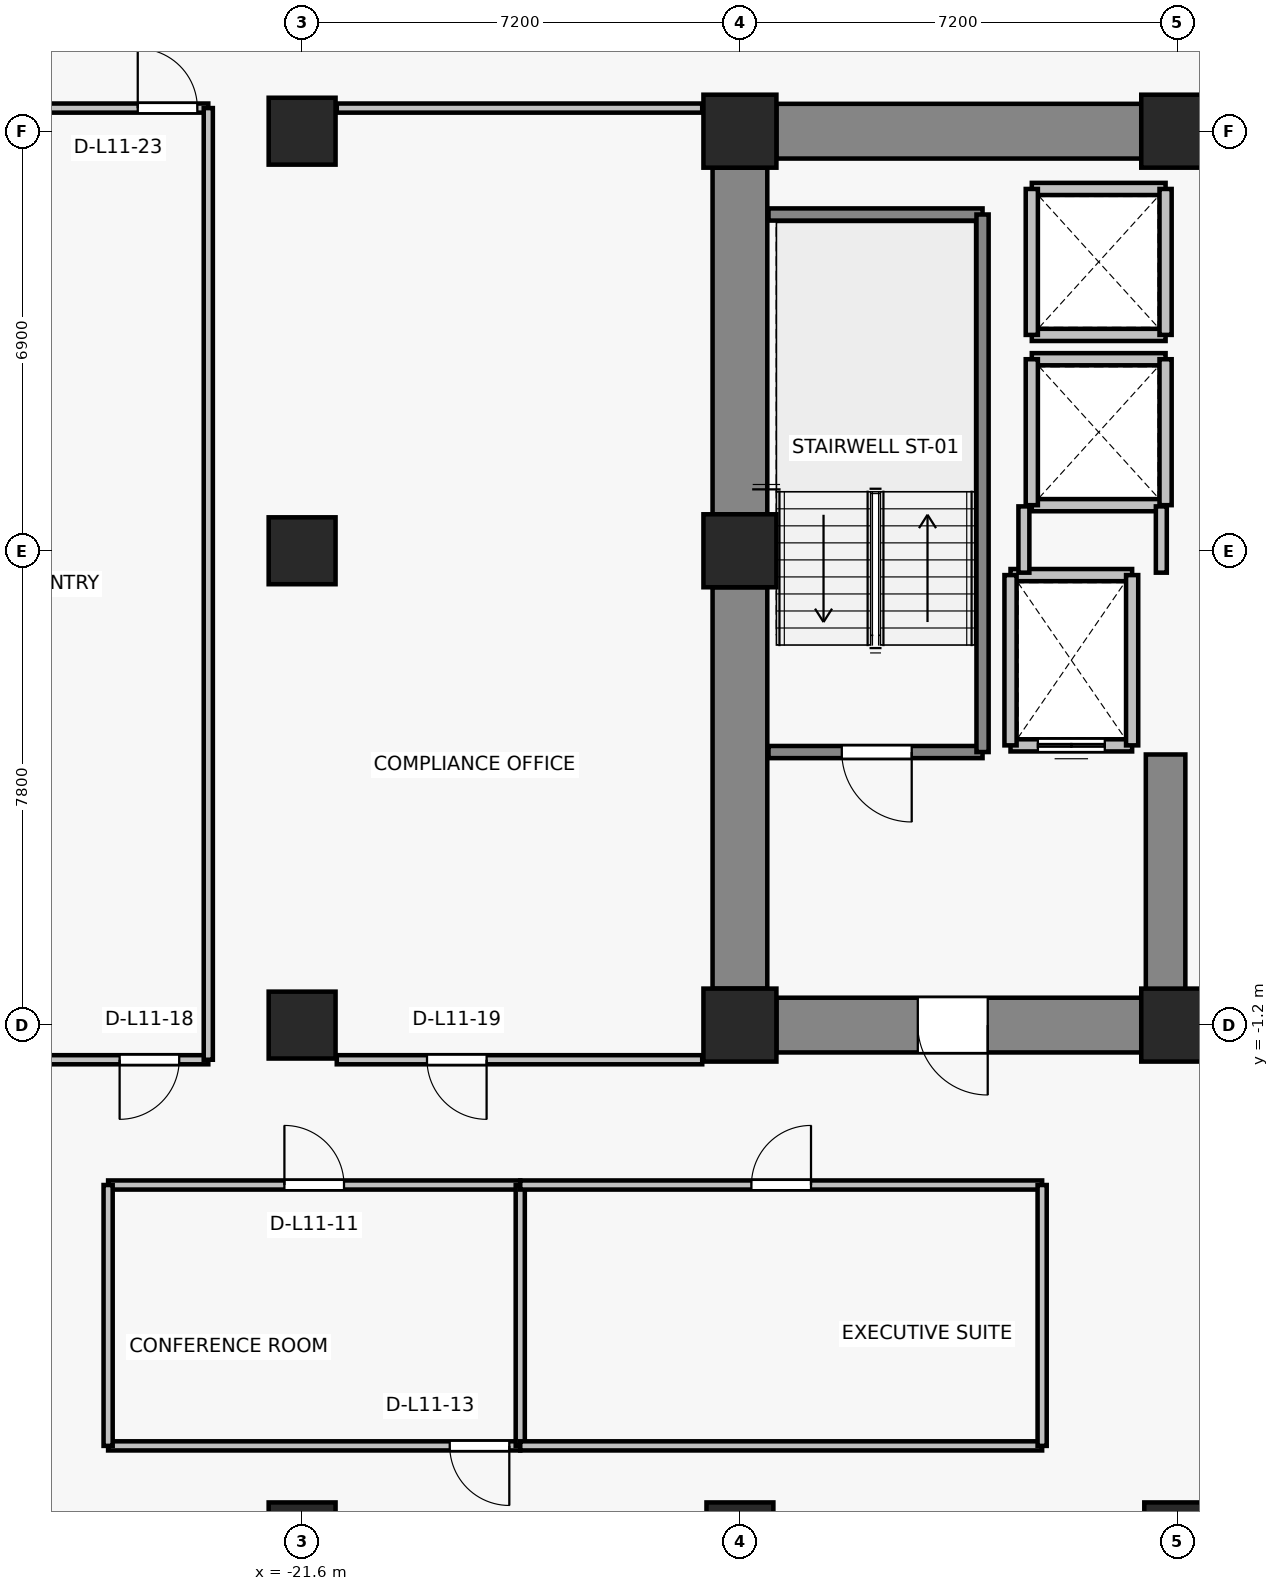
"""IFC4 building model, lengths in metres.
Left out: names, types, materials, properties, quantities, classifications, styles, units other than length and angle.
Written with IfcOpenShell. Run it as: python <this file> out.ifc"""

import sys

from ifc_helpers import new_model, si_unit, direction, frame, frame_2d, origin, origin_2d, place, context, subcontext, project, spatial, rectangle, extrude, source, transform, mapped, element, fill, save


model = new_model("IFC4")
c1 = context("Model", 3, precision=1e-05, world=origin(), true_north=direction((0.0, 1.0)))
c2 = subcontext(c1, "Body", "Model", "MODEL_VIEW")
j1 = project(units=[si_unit("LENGTHUNIT", "METRE"), si_unit("PLANEANGLEUNIT", "RADIAN")], contexts=[c1])
p1 = place(None, origin())
s1 = spatial("IfcSite", under=j1, at=p1, CompositionType="ELEMENT")
p2 = place(p1, origin())
s2 = spatial("IfcBuilding", under=s1, at=p2, CompositionType="ELEMENT")
p3 = place(p2, frame((0.0, 0.0, 43.9)))
s3 = spatial("IfcBuildingStorey", under=s2, at=p3, CompositionType="ELEMENT", Elevation=43.9)
for number, where, z_axis, x_axis in (
    (1, (-14.4, -1.2, 0.0), (0.0, 0.0, 1.0), (1.0, 0.0, 0.0)),
    (2, (-7.2, -1.2, 0.0), (0.0, 0.0, 1.0), (1.0, 0.0, 0.0)),
    (3, (-14.4, 6.6, 0.0), (0.0, 0.0, 1.0), (1.0, 0.0, 0.0)),
    (4, (-14.4, 13.5, 0.0), (0.0, 0.0, 1.0), (1.0, 0.0, 0.0)),
    (5, (-7.2, 13.5, 0.0), (0.0, 0.0, 1.0), (1.0, 0.0, 0.0)),
):
    element("IfcColumn", number, at=place(p3, frame(where, z_axis=z_axis, x_axis=x_axis)), inside=s3, PredefinedType="COLUMN", context=c2, shape_type="SweptSolid", body=[
        extrude(rectangle(XDim=1.2, YDim=1.2, at=origin_2d()), origin(), (0.0, 0.0, 1.0), 3.3),
    ])
for number, where, z_axis, x_axis in (
    (6, (-14.4, -9.6, 0.0), (0.0, 0.0, 1.0), (1.0, 0.0, 0.0)),
    (7, (-7.2, -9.6, 0.0), (0.0, 0.0, 1.0), (1.0, 0.0, 0.0)),
    (8, (-21.6, -9.6, 0.0), (0.0, 0.0, 1.0), (1.0, 0.0, 0.0)),
    (9, (-21.6, -1.2, 0.0), (0.0, 0.0, 1.0), (1.0, 0.0, 0.0)),
    (10, (-21.6, 6.6, 0.0), (0.0, 0.0, 1.0), (1.0, 0.0, 0.0)),
    (11, (-21.6, 13.5, 0.0), (0.0, 0.0, 1.0), (1.0, 0.0, 0.0)),
):
    element("IfcColumn", number, at=place(p3, frame(where, z_axis=z_axis, x_axis=x_axis)), inside=s3, PredefinedType="COLUMN", context=c2, shape_type="SweptSolid", body=[
        extrude(rectangle(XDim=1.1, YDim=1.1, at=origin_2d()), origin(), (0.0, 0.0, 1.0), 3.3),
    ])
p4 = place(p3, frame((-13.8, 13.5, 0.0), z_axis=(0.0, 0.0, 1.0), x_axis=(1.0, 0.0, 0.0)))
e12 = element("IfcWall", 12, at=p4, inside=s3, PredefinedType="SHEAR", context=c2, shape_type="SweptSolid", body=[
    extrude(rectangle(XDim=6.0, YDim=0.9, at=frame_2d((3.0, 0.0))), origin(), (0.0, 0.0, 1.0), 3.075),
])
p5 = place(p3, frame((-14.4, -0.6, 0.0), z_axis=(0.0, 0.0, 1.0), x_axis=(0.0, 1.0, 0.0)))
e13 = element("IfcWall", 13, at=p5, inside=s3, PredefinedType="SHEAR", context=c2, shape_type="SweptSolid", body=[
    extrude(rectangle(XDim=6.6, YDim=0.9, at=frame_2d((3.3, 0.0))), origin(), (0.0, 0.0, 1.0), 3.075),
])
p6 = place(p3, frame((-14.4, 7.2, 0.0), z_axis=(0.0, 0.0, 1.0), x_axis=(0.0, 1.0, 0.0)))
e14 = element("IfcWall", 14, at=p6, inside=s3, PredefinedType="SHEAR", context=c2, shape_type="SweptSolid", body=[
    extrude(rectangle(XDim=5.7, YDim=0.9, at=frame_2d((2.85, 0.0))), origin(), (0.0, 0.0, 1.0), 3.075),
])
p7 = place(p3, frame((-7.8, -1.2, 0.0), z_axis=(0.0, 0.0, 1.0), x_axis=(-1.0, 0.0, 0.0)))
e15 = element("IfcWall", 15, at=p7, inside=s3, PredefinedType="SHEAR", context=c2, shape_type="SweptSolid", body=[
    extrude(rectangle(XDim=6.0, YDim=0.9, at=frame_2d((3.0, 0.0))), origin(), (0.0, 0.0, 1.0), 3.075),
])
p8 = place(p7, frame((2.525, 0.0, 0.0)))
e16 = element("IfcOpeningElement", 16, at=p8, cuts=e15, PredefinedType="OPENING", context=c2, shape_type="SweptSolid", body=[
    extrude(rectangle(XDim=1.15, YDim=2.15, at=frame_2d((0.575, 1.075))), frame((0.0, 0.46, 0.0), z_axis=(0.0, -1.0, 0.0), x_axis=(1.0, 0.0, 0.0)), (0.0, 0.0, 1.0), 0.92),
])
p9 = place(p3, frame((-7.4, -0.75, 0.0), z_axis=(0.0, 0.0, 1.0), x_axis=(0.0, 1.0, 0.0)))
e17 = element("IfcWall", 17, at=p9, inside=s3, PredefinedType="SHEAR", context=c2, shape_type="SweptSolid", body=[
    extrude(rectangle(XDim=4.0, YDim=0.65, at=frame_2d((2.0, 0.0))), origin(), (0.0, 0.0, 1.0), 3.075),
])
p10 = place(p3, frame((-7.95, 3.4, 0.0), z_axis=(0.0, 0.0, 1.0), x_axis=(-1.0, 0.0, 0.0)))
e18 = element("IfcWall", 18, at=p10, inside=s3, PredefinedType="SOLIDWALL", context=c2, shape_type="SweptSolid", body=[
    extrude(rectangle(XDim=2.0, YDim=0.2, at=frame_2d((1.0, 0.0))), origin(), (0.0, 0.0, 1.0), 3.075),
])
p11 = place(p10, frame((0.45, 0.0, 0.0)))
e19 = element("IfcOpeningElement", 19, at=p11, cuts=e18, PredefinedType="OPENING", context=c2, shape_type="SweptSolid", body=[
    extrude(rectangle(XDim=1.1, YDim=2.2, at=frame_2d((0.55, 1.1))), frame((0.0, 0.11, 0.0), z_axis=(0.0, -1.0, 0.0), x_axis=(1.0, 0.0, 0.0)), (0.0, 0.0, 1.0), 0.22),
])
p12 = place(p3, frame((-9.95, 6.2, 0.0), z_axis=(0.0, 0.0, 1.0), x_axis=(1.0, 0.0, 0.0)))
e20 = element("IfcWall", 20, at=p12, inside=s3, PredefinedType="SOLIDWALL", context=c2, shape_type="SweptSolid", body=[
    extrude(rectangle(XDim=2.0, YDim=0.2, at=frame_2d((1.0, 0.0))), origin(), (0.0, 0.0, 1.0), 3.075),
])
for number, where, z_axis, x_axis in (
    (21, (-9.95, 3.4, 0.0), (0.0, 0.0, 1.0), (0.0, 1.0, 0.0)),
    (22, (-7.95, 6.2, 0.0), (0.0, 0.0, 1.0), (0.0, -1.0, 0.0)),
):
    element("IfcWall", number, at=place(p3, frame(where, z_axis=z_axis, x_axis=x_axis)), inside=s3, PredefinedType="SOLIDWALL", context=c2, shape_type="SweptSolid", body=[
        extrude(rectangle(XDim=2.8, YDim=0.2, at=frame_2d((1.4, 0.0))), origin(), (0.0, 0.0, 1.0), 3.075),
    ])
for number, where, z_axis, x_axis in (
    (23, (-7.4, 7.35, 0.0), (0.0, 0.0, 1.0), (-1.0, 0.0, 0.0)),
    (24, (-9.6, 9.75, 0.0), (0.0, 0.0, 1.0), (1.0, 0.0, 0.0)),
):
    element("IfcWall", number, at=place(p3, frame(where, z_axis=z_axis, x_axis=x_axis)), inside=s3, PredefinedType="SOLIDWALL", context=c2, shape_type="SweptSolid", body=[
        extrude(rectangle(XDim=2.2, YDim=0.2, at=frame_2d((1.1, 0.0))), origin(), (0.0, 0.0, 1.0), 2.465),
    ])
p13 = place(p3, frame((-9.6, 7.35, 0.0), z_axis=(0.0, 0.0, 1.0), x_axis=(0.0, 1.0, 0.0)))
e25 = element("IfcWall", 25, at=p13, inside=s3, PredefinedType="SOLIDWALL", context=c2, shape_type="SweptSolid", body=[
    extrude(rectangle(XDim=2.4, YDim=0.2, at=frame_2d((1.2, 0.0))), origin(), (0.0, 0.0, 1.0), 3.075),
])
p14 = place(p3, frame((-7.4, 9.75, 0.0), z_axis=(0.0, 0.0, 1.0), x_axis=(0.0, -1.0, 0.0)))
e26 = element("IfcWall", 26, at=p14, inside=s3, PredefinedType="SOLIDWALL", context=c2, shape_type="SweptSolid", body=[
    extrude(rectangle(XDim=2.4, YDim=0.2, at=frame_2d((1.2, 0.0))), origin(), (0.0, 0.0, 1.0), 2.465),
])
for number, where, z_axis, x_axis in (
    (27, (-7.4, 10.15, 0.0), (0.0, 0.0, 1.0), (-1.0, 0.0, 0.0)),
    (28, (-9.6, 12.55, 0.0), (0.0, 0.0, 1.0), (1.0, 0.0, 0.0)),
):
    element("IfcWall", number, at=place(p3, frame(where, z_axis=z_axis, x_axis=x_axis)), inside=s3, PredefinedType="SOLIDWALL", context=c2, shape_type="SweptSolid", body=[
        extrude(rectangle(XDim=2.2, YDim=0.2, at=frame_2d((1.1, 0.0))), origin(), (0.0, 0.0, 1.0), 2.465),
    ])
p15 = place(p3, frame((-9.6, 10.15, 0.0), z_axis=(0.0, 0.0, 1.0), x_axis=(0.0, 1.0, 0.0)))
e29 = element("IfcWall", 29, at=p15, inside=s3, PredefinedType="SOLIDWALL", context=c2, shape_type="SweptSolid", body=[
    extrude(rectangle(XDim=2.4, YDim=0.2, at=frame_2d((1.2, 0.0))), origin(), (0.0, 0.0, 1.0), 3.075),
])
p16 = place(p3, frame((-7.4, 12.55, 0.0), z_axis=(0.0, 0.0, 1.0), x_axis=(0.0, -1.0, 0.0)))
e30 = element("IfcWall", 30, at=p16, inside=s3, PredefinedType="SOLIDWALL", context=c2, shape_type="SweptSolid", body=[
    extrude(rectangle(XDim=2.4, YDim=0.2, at=frame_2d((1.2, 0.0))), origin(), (0.0, 0.0, 1.0), 2.465),
])
p17 = place(p3, frame((-10.41, 3.29, 0.0), z_axis=(0.0, 0.0, 1.0), x_axis=(-1.0, 0.0, 0.0)))
e31 = element("IfcWall", 31, at=p17, inside=s3, PredefinedType="SOLIDWALL", context=c2, shape_type="SweptSolid", body=[
    extrude(rectangle(XDim=3.52, YDim=0.2, at=frame_2d((1.76, 0.0))), origin(), (0.0, 0.0, 1.0), 3.075),
])
p18 = place(p17, frame((1.165, 0.0, 0.0)))
e32 = element("IfcOpeningElement", 32, at=p18, cuts=e31, PredefinedType="OPENING", context=c2, shape_type="SweptSolid", body=[
    extrude(rectangle(XDim=1.15, YDim=2.15, at=frame_2d((0.575, 1.075))), frame((0.0, 0.11, 0.0), z_axis=(0.0, -1.0, 0.0), x_axis=(1.0, 0.0, 0.0)), (0.0, 0.0, 1.0), 0.22),
])
p19 = place(p3, frame((-13.93, 12.13, 0.0), z_axis=(0.0, 0.0, 1.0), x_axis=(1.0, 0.0, 0.0)))
e33 = element("IfcWall", 33, at=p19, inside=s3, PredefinedType="SOLIDWALL", context=c2, shape_type="SweptSolid", body=[
    extrude(rectangle(XDim=3.52, YDim=0.2, at=frame_2d((1.76, 0.0))), origin(), (0.0, 0.0, 1.0), 3.075),
])
p20 = place(p3, frame((-10.41, 12.13, 0.0), z_axis=(0.0, 0.0, 1.0), x_axis=(0.0, -1.0, 0.0)))
e34 = element("IfcWall", 34, at=p20, inside=s3, PredefinedType="SOLIDWALL", context=c2, shape_type="SweptSolid", body=[
    extrude(rectangle(XDim=8.84, YDim=0.2, at=frame_2d((4.42, 0.0))), origin(), (0.0, 0.0, 1.0), 3.075),
])
p21 = place(p3, frame((-9.73, 6.24, 0.0), z_axis=(0.0, 0.0, 1.0), x_axis=(0.0, 1.0, 0.0)))
e35 = element("IfcWall", 35, at=p21, inside=s3, PredefinedType="PARTITIONING", context=c2, shape_type="SweptSolid", body=[
    extrude(rectangle(XDim=1.09, YDim=0.18, at=frame_2d((0.545, 0.0))), origin(), (0.0, 0.0, 1.0), 3.075),
])
p22 = place(p3, frame((-7.47, 7.33, 0.0), z_axis=(0.0, 0.0, 1.0), x_axis=(0.0, -1.0, 0.0)))
e36 = element("IfcWall", 36, at=p22, inside=s3, PredefinedType="PARTITIONING", context=c2, shape_type="SweptSolid", body=[
    extrude(rectangle(XDim=1.09, YDim=0.18, at=frame_2d((0.545, 0.0))), origin(), (0.0, 0.0, 1.0), 2.465),
])
p23 = place(p3, frame((-18.012, -8.12, 0.0), z_axis=(0.0, 0.0, 1.0), x_axis=(-1.0, 0.0, 0.0)))
e37 = element("IfcWall", 37, at=p23, inside=s3, PredefinedType="PARTITIONING", context=c2, shape_type="SweptSolid", body=[
    extrude(rectangle(XDim=6.778, YDim=0.15, at=frame_2d((3.389, 0.0))), origin(), (0.0, 0.0, 1.0), 2.465),
])
p24 = place(p23, frame((0.18, 0.0, 0.0)))
e38 = element("IfcOpeningElement", 38, at=p24, cuts=e37, PredefinedType="OPENING", context=c2, shape_type="SweptSolid", body=[
    extrude(rectangle(XDim=0.98, YDim=2.15, at=frame_2d((0.49, 1.075))), frame((0.0, 0.085, 0.0), z_axis=(0.0, -1.0, 0.0), x_axis=(1.0, 0.0, 0.0)), (0.0, 0.0, 1.0), 0.17),
])
p25 = place(p3, frame((-24.79, -3.83, 0.0), z_axis=(0.0, 0.0, 1.0), x_axis=(1.0, 0.0, 0.0)))
e39 = element("IfcWall", 39, at=p25, inside=s3, PredefinedType="PARTITIONING", context=c2, shape_type="SweptSolid", body=[
    extrude(rectangle(XDim=6.778, YDim=0.15, at=frame_2d((3.389, 0.0))), origin(), (0.0, 0.0, 1.0), 2.465),
])
p26 = place(p25, frame((2.899, 0.0, 0.0)))
e40 = element("IfcOpeningElement", 40, at=p26, cuts=e39, PredefinedType="OPENING", context=c2, shape_type="SweptSolid", body=[
    extrude(rectangle(XDim=0.98, YDim=2.15, at=frame_2d((0.49, 1.075))), frame((0.0, 0.085, 0.0), z_axis=(0.0, -1.0, 0.0), x_axis=(1.0, 0.0, 0.0)), (0.0, 0.0, 1.0), 0.17),
])
for number, where, z_axis, x_axis in (
    (41, (-24.79, -8.12, 0.0), (0.0, 0.0, 1.0), (0.0, 1.0, 0.0)),
    (42, (-18.012, -3.83, 0.0), (0.0, 0.0, 1.0), (0.0, -1.0, 0.0)),
):
    element("IfcWall", number, at=place(p3, frame(where, z_axis=z_axis, x_axis=x_axis)), inside=s3, PredefinedType="PARTITIONING", context=c2, shape_type="SweptSolid", body=[
        extrude(rectangle(XDim=4.29, YDim=0.15, at=frame_2d((2.145, 0.0))), origin(), (0.0, 0.0, 1.0), 2.565),
    ])
p27 = place(p3, frame((-9.43, -8.12, 0.0), z_axis=(0.0, 0.0, 1.0), x_axis=(-1.0, 0.0, 0.0)))
e43 = element("IfcWall", 43, at=p27, inside=s3, PredefinedType="PARTITIONING", context=c2, shape_type="SweptSolid", body=[
    extrude(rectangle(XDim=8.583, YDim=0.15, at=frame_2d((4.291, 0.0))), origin(), (0.0, 0.0, 1.0), 2.465),
])
p28 = place(p3, frame((-18.012, -3.83, 0.0), z_axis=(0.0, 0.0, 1.0), x_axis=(1.0, 0.0, 0.0)))
e44 = element("IfcWall", 44, at=p28, inside=s3, PredefinedType="PARTITIONING", context=c2, shape_type="SweptSolid", body=[
    extrude(rectangle(XDim=8.583, YDim=0.15, at=frame_2d((4.291, 0.0))), origin(), (0.0, 0.0, 1.0), 2.465),
])
p29 = place(p28, frame((3.802, 0.0, 0.0)))
e45 = element("IfcOpeningElement", 45, at=p29, cuts=e44, PredefinedType="OPENING", context=c2, shape_type="SweptSolid", body=[
    extrude(rectangle(XDim=0.98, YDim=2.15, at=frame_2d((0.49, 1.075))), frame((0.0, 0.085, 0.0), z_axis=(0.0, -1.0, 0.0), x_axis=(1.0, 0.0, 0.0)), (0.0, 0.0, 1.0), 0.17),
])
p30 = place(p3, frame((-9.43, -3.83, 0.0), z_axis=(0.0, 0.0, 1.0), x_axis=(0.0, -1.0, 0.0)))
e46 = element("IfcWall", 46, at=p30, inside=s3, PredefinedType="PARTITIONING", context=c2, shape_type="SweptSolid", body=[
    extrude(rectangle(XDim=4.29, YDim=0.15, at=frame_2d((2.145, 0.0))), origin(), (0.0, 0.0, 1.0), 2.565),
])
p31 = place(p3, frame((-23.143, -1.77, 0.0), z_axis=(0.0, 0.0, 1.0), x_axis=(-1.0, 0.0, 0.0)))
e47 = element("IfcWall", 47, at=p31, inside=s3, PredefinedType="PARTITIONING", context=c2, shape_type="SweptSolid", body=[
    extrude(rectangle(XDim=5.853, YDim=0.15, at=frame_2d((2.927, 0.0))), origin(), (0.0, 0.0, 1.0), 3.075),
])
p32 = place(p31, frame((0.478, 0.0, 0.0)))
e48 = element("IfcOpeningElement", 48, at=p32, cuts=e47, PredefinedType="OPENING", context=c2, shape_type="SweptSolid", body=[
    extrude(rectangle(XDim=0.98, YDim=2.15, at=frame_2d((0.49, 1.075))), frame((0.0, 0.085, 0.0), z_axis=(0.0, -1.0, 0.0), x_axis=(1.0, 0.0, 0.0)), (0.0, 0.0, 1.0), 0.17),
])
p33 = place(p3, frame((-28.996, 13.88, 0.0), z_axis=(0.0, 0.0, 1.0), x_axis=(1.0, 0.0, 0.0)))
e49 = element("IfcWall", 49, at=p33, inside=s3, PredefinedType="PARTITIONING", context=c2, shape_type="SweptSolid", body=[
    extrude(rectangle(XDim=5.853, YDim=0.15, at=frame_2d((2.927, 0.0))), origin(), (0.0, 0.0, 1.0), 3.075),
])
p34 = place(p33, frame((4.693, 0.0, 0.0)))
e50 = element("IfcOpeningElement", 50, at=p34, cuts=e49, PredefinedType="OPENING", context=c2, shape_type="SweptSolid", body=[
    extrude(rectangle(XDim=0.98, YDim=2.15, at=frame_2d((0.49, 1.075))), frame((0.0, 0.085, 0.0), z_axis=(0.0, -1.0, 0.0), x_axis=(1.0, 0.0, 0.0)), (0.0, 0.0, 1.0), 0.17),
])
p35 = place(p3, frame((-23.143, 13.88, 0.0), z_axis=(0.0, 0.0, 1.0), x_axis=(0.0, -1.0, 0.0)))
e51 = element("IfcWall", 51, at=p35, inside=s3, PredefinedType="PARTITIONING", context=c2, shape_type="SweptSolid", body=[
    extrude(rectangle(XDim=15.65, YDim=0.15, at=frame_2d((7.825, 0.0))), origin(), (0.0, 0.0, 1.0), 2.465),
])
p36 = place(p3, frame((-15.02, -1.77, 0.0), z_axis=(0.0, 0.0, 1.0), x_axis=(-1.0, 0.0, 0.0)))
e52 = element("IfcWall", 52, at=p36, inside=s3, PredefinedType="PARTITIONING", context=c2, shape_type="SweptSolid", body=[
    extrude(rectangle(XDim=6.01, YDim=0.15, at=frame_2d((3.005, 0.0))), origin(), (0.0, 0.0, 1.0), 3.075),
])
p37 = place(p36, frame((3.546, 0.0, 0.0)))
e53 = element("IfcOpeningElement", 53, at=p37, cuts=e52, PredefinedType="OPENING", context=c2, shape_type="SweptSolid", body=[
    extrude(rectangle(XDim=0.98, YDim=2.15, at=frame_2d((0.49, 1.075))), frame((0.0, 0.085, 0.0), z_axis=(0.0, -1.0, 0.0), x_axis=(1.0, 0.0, 0.0)), (0.0, 0.0, 1.0), 0.17),
])
p38 = place(p3, frame((-21.03, 13.88, 0.0), z_axis=(0.0, 0.0, 1.0), x_axis=(1.0, 0.0, 0.0)))
e54 = element("IfcWall", 54, at=p38, inside=s3, PredefinedType="PARTITIONING", context=c2, shape_type="SweptSolid", body=[
    extrude(rectangle(XDim=6.01, YDim=0.15, at=frame_2d((3.005, 0.0))), origin(), (0.0, 0.0, 1.0), 3.075),
])
m1 = source(origin(), c2, "Body", "SweptSolid", [
    extrude(rectangle(XDim=1.1, YDim=2.2, at=frame_2d((0.55, 1.1))), frame((0.0, 0.025, 0.0), z_axis=(0.0, -1.0, 0.0), x_axis=(1.0, 0.0, 0.0)), (0.0, 0.0, 1.0), 0.05),
])
p39 = place(p11, origin())
e55 = element("IfcDoor", 55, at=p39, inside=s3, OperationType="DOUBLE_DOOR_SLIDING", PredefinedType="DOOR", context=c2, shape_type="MappedRepresentation", body=[
    mapped(m1, transform((0.0, 0.0, 0.0), x_axis=(1.0, 0.0, 0.0), y_axis=(0.0, 1.0, 0.0), z_axis=(0.0, 0.0, 1.0), scale=1.0)),
])
fill(e19, e55)
m2 = source(origin(), c2, "Body", "SweptSolid", [
    extrude(rectangle(XDim=1.15, YDim=2.15, at=frame_2d((0.575, 1.075))), frame((0.0, 0.025, 0.0), z_axis=(0.0, -1.0, 0.0), x_axis=(1.0, 0.0, 0.0)), (0.0, 0.0, 1.0), 0.05),
])
p40 = place(p18, origin())
e56 = element("IfcDoor", 56, at=p40, inside=s3, OperationType="SINGLE_SWING_LEFT", PredefinedType="DOOR", context=c2, shape_type="MappedRepresentation", body=[
    mapped(m2, transform((0.0, 0.0, 0.0), x_axis=(1.0, 0.0, 0.0), y_axis=(0.0, 1.0, 0.0), z_axis=(0.0, 0.0, 1.0), scale=1.0)),
])
fill(e32, e56)
p41 = place(p8, origin())
e57 = element("IfcDoor", 57, at=p41, inside=s3, OperationType="SINGLE_SWING_LEFT", PredefinedType="DOOR", context=c2, shape_type="MappedRepresentation", body=[
    mapped(m2, transform((0.0, 0.0, 0.0), x_axis=(1.0, 0.0, 0.0), y_axis=(0.0, 1.0, 0.0), z_axis=(0.0, 0.0, 1.0), scale=1.0)),
])
fill(e16, e57)
m3 = source(origin(), c2, "Body", "SweptSolid", [
    extrude(rectangle(XDim=0.98, YDim=2.15, at=frame_2d((0.49, 1.075))), frame((0.0, 0.025, 0.0), z_axis=(0.0, -1.0, 0.0), x_axis=(1.0, 0.0, 0.0)), (0.0, 0.0, 1.0), 0.05),
])
p42 = place(p26, origin())
e58 = element("IfcDoor", 58, at=p42, inside=s3, OperationType="SINGLE_SWING_LEFT", PredefinedType="DOOR", context=c2, shape_type="MappedRepresentation", body=[
    mapped(m3, transform((0.0, 0.0, 0.0), x_axis=(1.0, 0.0, 0.0), y_axis=(0.0, 1.0, 0.0), z_axis=(0.0, 0.0, 1.0), scale=1.0)),
])
fill(e40, e58)
p43 = place(p29, origin())
e59 = element("IfcDoor", 59, at=p43, inside=s3, OperationType="SINGLE_SWING_RIGHT", PredefinedType="DOOR", context=c2, shape_type="MappedRepresentation", body=[
    mapped(m3, transform((0.0, 0.0, 0.0), x_axis=(1.0, 0.0, 0.0), y_axis=(0.0, 1.0, 0.0), z_axis=(0.0, 0.0, 1.0), scale=1.0)),
])
fill(e45, e59)
p44 = place(p24, origin())
e60 = element("IfcDoor", 60, at=p44, inside=s3, OperationType="SINGLE_SWING_LEFT", PredefinedType="DOOR", context=c2, shape_type="MappedRepresentation", body=[
    mapped(m3, transform((0.0, 0.0, 0.0), x_axis=(1.0, 0.0, 0.0), y_axis=(0.0, 1.0, 0.0), z_axis=(0.0, 0.0, 1.0), scale=1.0)),
])
fill(e38, e60)
p45 = place(p32, origin())
e61 = element("IfcDoor", 61, at=p45, inside=s3, OperationType="SINGLE_SWING_RIGHT", PredefinedType="DOOR", context=c2, shape_type="MappedRepresentation", body=[
    mapped(m3, transform((0.0, 0.0, 0.0), x_axis=(1.0, 0.0, 0.0), y_axis=(0.0, 1.0, 0.0), z_axis=(0.0, 0.0, 1.0), scale=1.0)),
])
fill(e48, e61)
p46 = place(p37, origin())
e62 = element("IfcDoor", 62, at=p46, inside=s3, OperationType="SINGLE_SWING_LEFT", PredefinedType="DOOR", context=c2, shape_type="MappedRepresentation", body=[
    mapped(m3, transform((0.0, 0.0, 0.0), x_axis=(1.0, 0.0, 0.0), y_axis=(0.0, 1.0, 0.0), z_axis=(0.0, 0.0, 1.0), scale=1.0)),
])
fill(e53, e62)
p47 = place(p34, origin())
e63 = element("IfcDoor", 63, at=p47, inside=s3, OperationType="SINGLE_SWING_LEFT", PredefinedType="DOOR", context=c2, shape_type="MappedRepresentation", body=[
    mapped(m3, transform((0.0, 0.0, 0.0), x_axis=(1.0, 0.0, 0.0), y_axis=(0.0, 1.0, 0.0), z_axis=(0.0, 0.0, 1.0), scale=1.0)),
])
fill(e50, e63)
save(model, sys.argv[1])
